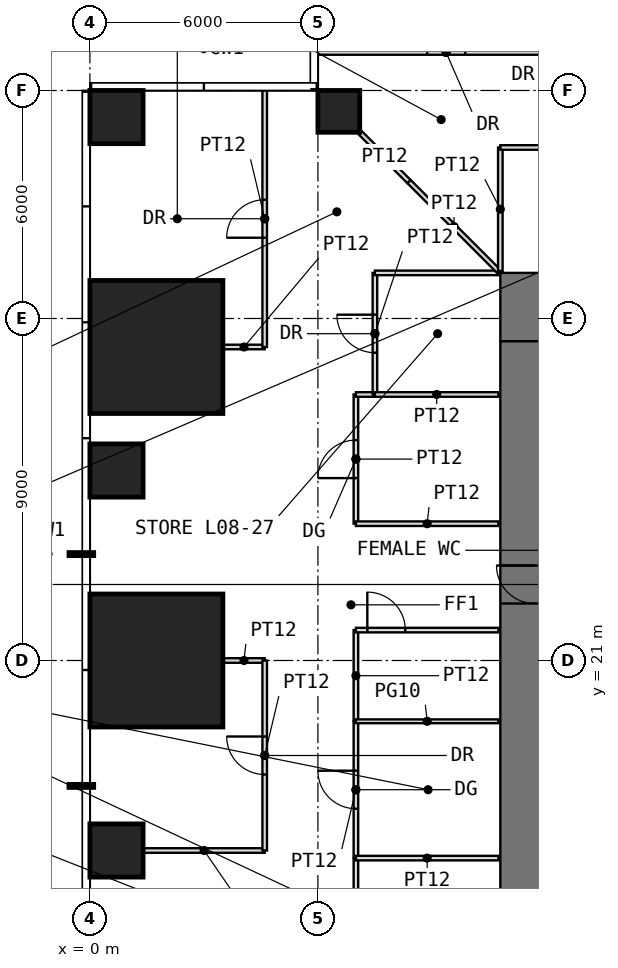
"""IFC4 building model, lengths in metres.
Left out: names, types, materials, properties, quantities, classifications, styles, units other than length and angle.
Written with IfcOpenShell. Run it as: python <this file> out.ifc"""

import sys

from ifc_helpers import new_model, si_unit, direction, frame, frame_2d, origin, origin_2d, place, context, subcontext, project, spatial, rectangle, extrude, element, fill, save


model = new_model("IFC4")
c1 = context("Model", 3, precision=1e-05, world=origin(), true_north=direction((0.0, 1.0)))
c2 = subcontext(c1, "Body", "Model", "MODEL_VIEW")
j1 = project(units=[si_unit("LENGTHUNIT", "METRE"), si_unit("PLANEANGLEUNIT", "RADIAN")], contexts=[c1])
p1 = place(None, origin())
s1 = spatial("IfcSite", under=j1, at=p1, CompositionType="ELEMENT")
p2 = place(p1, origin())
s2 = spatial("IfcBuilding", under=s1, at=p2, CompositionType="ELEMENT")
p3 = place(p2, frame((0.0, 0.0, 38.5)))
s3 = spatial("IfcBuildingStorey", under=s2, at=p3, CompositionType="ELEMENT", Elevation=38.5)
p4 = place(p3, frame((0.7, 16.0, 0.0), z_axis=(0.0, 0.0, 1.0), x_axis=(1.0, 0.0, 0.0)))
e1 = element("IfcColumn", 1, at=p4, inside=s3, PredefinedType="COLUMN", context=c2, shape_type="SweptSolid", body=[
    extrude(rectangle(XDim=1.4, YDim=1.4, at=origin_2d()), origin(), (0.0, 0.0, 1.0), 4.0),
])
p5 = place(p3, frame((1.75, 21.0, 0.0), z_axis=(0.0, 0.0, 1.0), x_axis=(1.0, 0.0, 0.0)))
e2 = element("IfcColumn", 2, at=p5, inside=s3, PredefinedType="COLUMN", context=c2, shape_type="SweptSolid", body=[
    extrude(rectangle(XDim=3.5, YDim=3.5, at=origin_2d()), origin(), (0.0, 0.0, 1.0), 4.0),
])
p6 = place(p3, frame((0.7, 26.0, 0.0), z_axis=(0.0, 0.0, 1.0), x_axis=(1.0, 0.0, 0.0)))
e3 = element("IfcColumn", 3, at=p6, inside=s3, PredefinedType="COLUMN", context=c2, shape_type="SweptSolid", body=[
    extrude(rectangle(XDim=1.4, YDim=1.4, at=origin_2d()), origin(), (0.0, 0.0, 1.0), 4.0),
])
p7 = place(p3, frame((1.75, 29.25, 0.0), z_axis=(0.0, 0.0, 1.0), x_axis=(1.0, 0.0, 0.0)))
e4 = element("IfcColumn", 4, at=p7, inside=s3, PredefinedType="COLUMN", context=c2, shape_type="SweptSolid", body=[
    extrude(rectangle(XDim=3.5, YDim=3.5, at=origin_2d()), origin(), (0.0, 0.0, 1.0), 4.0),
])
p8 = place(p3, frame((0.7, 35.3, 0.0), z_axis=(0.0, 0.0, 1.0), x_axis=(1.0, 0.0, 0.0)))
e5 = element("IfcColumn", 5, at=p8, inside=s3, PredefinedType="COLUMN", context=c2, shape_type="SweptSolid", body=[
    extrude(rectangle(XDim=1.4, YDim=1.4, at=origin_2d()), origin(), (0.0, 0.0, 1.0), 4.0),
])
p9 = place(p3, frame((6.55, 35.45, 0.0), z_axis=(0.0, 0.0, 1.0), x_axis=(1.0, 0.0, 0.0)))
e6 = element("IfcColumn", 6, at=p9, inside=s3, PredefinedType="COLUMN", context=c2, shape_type="SweptSolid", body=[
    extrude(rectangle(XDim=1.1, YDim=1.1, at=origin_2d()), origin(), (0.0, 0.0, 1.0), 4.0),
])
p10 = place(p3, frame((10.8, 30.3, -0.05), z_axis=(0.0, 0.0, 1.0), x_axis=(1.0, 0.0, 0.0)))
e7 = element("IfcWall", 7, at=p10, inside=s3, PredefinedType="SHEAR", context=c2, shape_type="SweptSolid", body=[
    extrude(rectangle(XDim=20.4, YDim=1.8, at=frame_2d((10.2, 0.0))), origin(), (0.0, 0.0, 1.0), 4.0),
])
p11 = place(p10, frame((9.2, 0.0, 0.05)))
e8 = element("IfcOpeningElement", 8, at=p11, cuts=e7, PredefinedType="OPENING", context=c2, shape_type="SweptSolid", body=[
    extrude(rectangle(XDim=2.0, YDim=2.2, at=frame_2d((1.0, 1.1))), frame((0.0, 0.91, 0.0), z_axis=(0.0, -1.0, 0.0), x_axis=(1.0, 0.0, 0.0)), (0.0, 0.0, 1.0), 1.82),
])
p12 = place(p3, frame((11.7, 12.6, -0.05), z_axis=(0.0, 0.0, 1.0), x_axis=(0.0, 1.0, 0.0)))
e9 = element("IfcWall", 9, at=p12, inside=s3, PredefinedType="SHEAR", context=c2, shape_type="SweptSolid", body=[
    extrude(rectangle(XDim=16.8, YDim=1.8, at=frame_2d((8.4, 0.0))), origin(), (0.0, 0.0, 1.0), 4.0),
])
p13 = place(p12, frame((9.9, 0.0, 0.05)))
e10 = element("IfcOpeningElement", 10, at=p13, cuts=e9, PredefinedType="OPENING", context=c2, shape_type="SweptSolid", body=[
    extrude(rectangle(XDim=1.0, YDim=2.2, at=frame_2d((0.5, 1.1))), frame((0.0, 0.91, 0.0), z_axis=(0.0, -1.0, 0.0), x_axis=(1.0, 0.0, 0.0)), (0.0, 0.0, 1.0), 1.82),
])
p14 = place(p3, frame((1.41, 16.0, 0.0), z_axis=(0.0, 0.0, 1.0), x_axis=(1.0, 0.0, 0.0)))
e11 = element("IfcWall", 11, at=p14, inside=s3, PredefinedType="PARTITIONING", context=c2, shape_type="SweptSolid", body=[
    extrude(rectangle(XDim=3.19, YDim=0.12, at=frame_2d((1.595, 0.0))), origin(), (0.0, 0.0, 1.0), 3.75),
])
for number, where, z_axis, x_axis in (
    (12, (3.51, 21.0, 0.0), (0.0, 0.0, 1.0), (1.0, 0.0, 0.0)),
    (13, (3.51, 29.25, 0.0), (0.0, 0.0, 1.0), (1.0, 0.0, 0.0)),
):
    element("IfcWall", number, at=place(p3, frame(where, z_axis=z_axis, x_axis=x_axis)), inside=s3, PredefinedType="PARTITIONING", context=c2, shape_type="SweptSolid", body=[
        extrude(rectangle(XDim=1.09, YDim=0.12, at=frame_2d((0.545, 0.0))), origin(), (0.0, 0.0, 1.0), 3.75),
    ])
p15 = place(p3, frame((4.6, 16.0, 0.0), z_axis=(0.0, 0.0, 1.0), x_axis=(0.0, 1.0, 0.0)))
e14 = element("IfcWall", 14, at=p15, inside=s3, PredefinedType="PARTITIONING", context=c2, shape_type="SweptSolid", body=[
    extrude(rectangle(XDim=5.0, YDim=0.12, at=frame_2d((2.5, 0.0))), origin(), (0.0, 0.0, 1.0), 3.75),
])
p16 = place(p15, frame((2.0, 0.0, 0.0)))
e15 = element("IfcOpeningElement", 15, at=p16, cuts=e14, PredefinedType="OPENING", context=c2, shape_type="SweptSolid", body=[
    extrude(rectangle(XDim=1.0, YDim=2.2, at=frame_2d((0.5, 1.1))), frame((0.0, 0.07, 0.0), z_axis=(0.0, -1.0, 0.0), x_axis=(1.0, 0.0, 0.0)), (0.0, 0.0, 1.0), 0.14),
])
p17 = place(p3, frame((4.6, 29.25, 0.0), z_axis=(0.0, 0.0, 1.0), x_axis=(0.0, 1.0, 0.0)))
e16 = element("IfcWall", 16, at=p17, inside=s3, PredefinedType="PARTITIONING", context=c2, shape_type="SweptSolid", body=[
    extrude(rectangle(XDim=6.75, YDim=0.12, at=frame_2d((3.375, 0.0))), origin(), (0.0, 0.0, 1.0), 3.75),
])
p18 = place(p17, frame((2.875, 0.0, 0.0)))
e17 = element("IfcOpeningElement", 17, at=p18, cuts=e16, PredefinedType="OPENING", context=c2, shape_type="SweptSolid", body=[
    extrude(rectangle(XDim=1.0, YDim=2.2, at=frame_2d((0.5, 1.1))), frame((0.0, 0.07, 0.0), z_axis=(0.0, -1.0, 0.0), x_axis=(1.0, 0.0, 0.0)), (0.0, 0.0, 1.0), 0.14),
])
p19 = place(p3, frame((6.0, 37.0, 0.0), z_axis=(0.0, 0.0, 1.0), x_axis=(1.0, 0.0, 0.0)))
e18 = element("IfcWall", 18, at=p19, inside=s3, PredefinedType="PARTITIONING", context=c2, shape_type="SweptSolid", body=[
    extrude(rectangle(XDim=6.75, YDim=0.12, at=frame_2d((3.375, 0.0))), origin(), (0.0, 0.0, 1.0), 3.75),
])
p20 = place(p19, frame((2.875, 0.0, 0.0)))
e19 = element("IfcOpeningElement", 19, at=p20, cuts=e18, PredefinedType="OPENING", context=c2, shape_type="SweptSolid", body=[
    extrude(rectangle(XDim=1.0, YDim=2.2, at=frame_2d((0.5, 1.1))), frame((0.0, 0.07, 0.0), z_axis=(0.0, -1.0, 0.0), x_axis=(1.0, 0.0, 0.0)), (0.0, 0.0, 1.0), 0.14),
])
p21 = place(p3, frame((7.0, 10.8, 0.0), z_axis=(0.0, 0.0, 1.0), x_axis=(0.0, 1.0, 0.0)))
e20 = element("IfcWall", 20, at=p21, inside=s3, PredefinedType="PARTITIONING", context=c2, shape_type="SweptSolid", body=[
    extrude(rectangle(XDim=5.0, YDim=0.12, at=frame_2d((2.5, 0.0))), origin(), (0.0, 0.0, 1.0), 3.75),
])
p22 = place(p21, frame((2.0, 0.0, 0.0)))
e21 = element("IfcOpeningElement", 21, at=p22, cuts=e20, PredefinedType="OPENING", context=c2, shape_type="SweptSolid", body=[
    extrude(rectangle(XDim=1.0, YDim=2.2, at=frame_2d((0.5, 1.1))), frame((0.0, 0.07, 0.0), z_axis=(0.0, -1.0, 0.0), x_axis=(1.0, 0.0, 0.0)), (0.0, 0.0, 1.0), 0.14),
])
p23 = place(p3, frame((7.0, 15.8, 0.0), z_axis=(0.0, 0.0, 1.0), x_axis=(0.0, 1.0, 0.0)))
e22 = element("IfcWall", 22, at=p23, inside=s3, PredefinedType="PARTITIONING", context=c2, shape_type="SweptSolid", body=[
    extrude(rectangle(XDim=3.6, YDim=0.12, at=frame_2d((1.8, 0.0))), origin(), (0.0, 0.0, 1.0), 3.75),
])
p24 = place(p23, frame((1.3, 0.0, 0.0)))
e23 = element("IfcOpeningElement", 23, at=p24, cuts=e22, PredefinedType="OPENING", context=c2, shape_type="SweptSolid", body=[
    extrude(rectangle(XDim=1.0, YDim=2.4, at=frame_2d((0.5, 1.2))), frame((0.0, 0.07, 0.0), z_axis=(0.0, -1.0, 0.0), x_axis=(1.0, 0.0, 0.0)), (0.0, 0.0, 1.0), 0.14),
])
p25 = place(p3, frame((7.0, 15.8, 0.0), z_axis=(0.0, 0.0, 1.0), x_axis=(1.0, 0.0, 0.0)))
e24 = element("IfcWall", 24, at=p25, inside=s3, PredefinedType="PARTITIONING", context=c2, shape_type="SweptSolid", body=[
    extrude(rectangle(XDim=3.75, YDim=0.12, at=frame_2d((1.875, 0.0))), origin(), (0.0, 0.0, 1.0), 3.75),
])
p26 = place(p3, frame((7.0, 19.4, 0.0), z_axis=(0.0, 0.0, 1.0), x_axis=(0.0, 1.0, 0.0)))
e25 = element("IfcWall", 25, at=p26, inside=s3, PredefinedType="PARTITIONING", context=c2, shape_type="SweptSolid", body=[
    extrude(rectangle(XDim=2.4, YDim=0.12, at=frame_2d((1.2, 0.0))), origin(), (0.0, 0.0, 1.0), 3.75),
])
p27 = place(p3, frame((7.0, 19.4, 0.0), z_axis=(0.0, 0.0, 1.0), x_axis=(1.0, 0.0, 0.0)))
e26 = element("IfcWall", 26, at=p27, inside=s3, PredefinedType="PARTITIONING", context=c2, shape_type="SweptSolid", body=[
    extrude(rectangle(XDim=3.75, YDim=0.1, at=frame_2d((1.875, 0.0))), origin(), (0.0, 0.0, 1.0), 3.75),
])
p28 = place(p3, frame((7.0, 21.8, 0.0), z_axis=(0.0, 0.0, 1.0), x_axis=(1.0, 0.0, 0.0)))
e27 = element("IfcWall", 27, at=p28, inside=s3, PredefinedType="PARTITIONING", context=c2, shape_type="SweptSolid", body=[
    extrude(rectangle(XDim=3.75, YDim=0.12, at=frame_2d((1.875, 0.0))), origin(), (0.0, 0.0, 1.0), 3.75),
])
p29 = place(p28, frame((0.3, 0.0, 0.0)))
e28 = element("IfcOpeningElement", 28, at=p29, cuts=e27, PredefinedType="OPENING", context=c2, shape_type="SweptSolid", body=[
    extrude(rectangle(XDim=1.0, YDim=2.4, at=frame_2d((0.5, 1.2))), frame((0.0, 0.07, 0.0), z_axis=(0.0, -1.0, 0.0), x_axis=(1.0, 0.0, 0.0)), (0.0, 0.0, 1.0), 0.14),
])
p30 = place(p3, frame((7.0, 24.6, 0.0), z_axis=(0.0, 0.0, 1.0), x_axis=(0.0, 1.0, 0.0)))
e29 = element("IfcWall", 29, at=p30, inside=s3, PredefinedType="PARTITIONING", context=c2, shape_type="SweptSolid", body=[
    extrude(rectangle(XDim=3.4, YDim=0.12, at=frame_2d((1.7, 0.0))), origin(), (0.0, 0.0, 1.0), 3.75),
])
p31 = place(p30, frame((1.2, 0.0, 0.0)))
e30 = element("IfcOpeningElement", 30, at=p31, cuts=e29, PredefinedType="OPENING", context=c2, shape_type="SweptSolid", body=[
    extrude(rectangle(XDim=1.0, YDim=2.4, at=frame_2d((0.5, 1.2))), frame((0.0, 0.07, 0.0), z_axis=(0.0, -1.0, 0.0), x_axis=(1.0, 0.0, 0.0)), (0.0, 0.0, 1.0), 0.14),
])
p32 = place(p3, frame((7.0, 24.6, 0.0), z_axis=(0.0, 0.0, 1.0), x_axis=(1.0, 0.0, 0.0)))
e31 = element("IfcWall", 31, at=p32, inside=s3, PredefinedType="PARTITIONING", context=c2, shape_type="SweptSolid", body=[
    extrude(rectangle(XDim=3.75, YDim=0.12, at=frame_2d((1.875, 0.0))), origin(), (0.0, 0.0, 1.0), 3.75),
])
p33 = place(p3, frame((7.0, 28.0, 0.0), z_axis=(0.0, 0.0, 1.0), x_axis=(1.0, 0.0, 0.0)))
e32 = element("IfcWall", 32, at=p33, inside=s3, PredefinedType="PARTITIONING", context=c2, shape_type="SweptSolid", body=[
    extrude(rectangle(XDim=0.5, YDim=0.12, at=frame_2d((0.25, 0.0))), origin(), (0.0, 0.0, 1.0), 3.75),
])
p34 = place(p3, frame((7.11, 34.89, 0.0), z_axis=(0.0, 0.0, 1.0), x_axis=(0.707106781187, -0.707106781187, 0.0)))
e33 = element("IfcWall", 33, at=p34, inside=s3, PredefinedType="PARTITIONING", context=c2, shape_type="SweptSolid", body=[
    extrude(rectangle(XDim=1.822, YDim=0.12, at=frame_2d((0.911, 0.0))), origin(), (0.0, 0.0, 1.0), 3.75),
])
p35 = place(p3, frame((7.5, 28.0, 0.0), z_axis=(0.0, 0.0, 1.0), x_axis=(0.0, 1.0, 0.0)))
e34 = element("IfcWall", 34, at=p35, inside=s3, PredefinedType="PARTITIONING", context=c2, shape_type="SweptSolid", body=[
    extrude(rectangle(XDim=3.2, YDim=0.12, at=frame_2d((1.6, 0.0))), origin(), (0.0, 0.0, 1.0), 3.75),
])
p36 = place(p35, frame((1.1, 0.0, 0.0)))
e35 = element("IfcOpeningElement", 35, at=p36, cuts=e34, PredefinedType="OPENING", context=c2, shape_type="SweptSolid", body=[
    extrude(rectangle(XDim=1.0, YDim=2.2, at=frame_2d((0.5, 1.1))), frame((0.0, 0.07, 0.0), z_axis=(0.0, -1.0, 0.0), x_axis=(1.0, 0.0, 0.0)), (0.0, 0.0, 1.0), 0.14),
])
for number, where, z_axis, x_axis in (
    (36, (7.5, 28.0, 0.0), (0.0, 0.0, 1.0), (1.0, 0.0, 0.0)),
    (37, (7.5, 31.2, 0.0), (0.0, 0.0, 1.0), (1.0, 0.0, 0.0)),
):
    element("IfcWall", number, at=place(p3, frame(where, z_axis=z_axis, x_axis=x_axis)), inside=s3, PredefinedType="PARTITIONING", context=c2, shape_type="SweptSolid", body=[
        extrude(rectangle(XDim=3.25, YDim=0.12, at=frame_2d((1.625, 0.0))), origin(), (0.0, 0.0, 1.0), 3.75),
    ])
p37 = place(p3, frame((8.398, 33.602, 0.0), z_axis=(0.0, 0.0, 1.0), x_axis=(0.707106781187, -0.707106781187, 0.0)))
e38 = element("IfcWall", 38, at=p37, inside=s3, PredefinedType="PARTITIONING", context=c2, shape_type="SweptSolid", body=[
    extrude(rectangle(XDim=3.346, YDim=0.12, at=frame_2d((1.673, 0.0))), origin(), (0.0, 0.0, 1.0), 3.75),
])
p38 = place(p3, frame((10.8, 31.25, 0.0), z_axis=(0.0, 0.0, 1.0), x_axis=(0.0, 1.0, 0.0)))
e39 = element("IfcWall", 39, at=p38, inside=s3, PredefinedType="PARTITIONING", context=c2, shape_type="SweptSolid", body=[
    extrude(rectangle(XDim=3.25, YDim=0.12, at=frame_2d((1.625, 0.0))), origin(), (0.0, 0.0, 1.0), 3.75),
])
p39 = place(p3, frame((10.8, 34.5, 0.0), z_axis=(0.0, 0.0, 1.0), x_axis=(1.0, 0.0, 0.0)))
e40 = element("IfcWall", 40, at=p39, inside=s3, PredefinedType="PARTITIONING", context=c2, shape_type="SweptSolid", body=[
    extrude(rectangle(XDim=3.4, YDim=0.12, at=frame_2d((1.7, 0.0))), origin(), (0.0, 0.0, 1.0), 3.75),
])
p40 = place(p39, frame((1.2, 0.0, 0.0)))
e41 = element("IfcOpeningElement", 41, at=p40, cuts=e40, PredefinedType="OPENING", context=c2, shape_type="SweptSolid", body=[
    extrude(rectangle(XDim=1.0, YDim=2.2, at=frame_2d((0.5, 1.1))), frame((0.0, 0.07, 0.0), z_axis=(0.0, -1.0, 0.0), x_axis=(1.0, 0.0, 0.0)), (0.0, 0.0, 1.0), 0.14),
])
p41 = place(p13, origin())
e42 = element("IfcDoor", 42, at=p41, inside=s3, OperationType="SINGLE_SWING_RIGHT", PredefinedType="DOOR", context=c2, shape_type="SweptSolid", body=[
    extrude(rectangle(XDim=1.0, YDim=2.2, at=frame_2d((0.5, 1.1))), frame((0.0, 0.025, 0.0), z_axis=(0.0, -1.0, 0.0), x_axis=(1.0, 0.0, 0.0)), (0.0, 0.0, 1.0), 0.05),
])
fill(e10, e42)
p42 = place(p20, origin())
e43 = element("IfcDoor", 43, at=p42, inside=s3, OperationType="SINGLE_SWING_RIGHT", PredefinedType="DOOR", context=c2, shape_type="SweptSolid", body=[
    extrude(rectangle(XDim=1.0, YDim=2.2, at=frame_2d((0.5, 1.1))), frame((0.0, 0.025, 0.0), z_axis=(0.0, -1.0, 0.0), x_axis=(1.0, 0.0, 0.0)), (0.0, 0.0, 1.0), 0.05),
])
fill(e19, e43)
p43 = place(p24, origin())
e44 = element("IfcDoor", 44, at=p43, inside=s3, OperationType="SINGLE_SWING_RIGHT", PredefinedType="DOOR", context=c2, shape_type="SweptSolid", body=[
    extrude(rectangle(XDim=1.0, YDim=2.4, at=frame_2d((0.5, 1.2))), frame((0.0, 0.025, 0.0), z_axis=(0.0, -1.0, 0.0), x_axis=(1.0, 0.0, 0.0)), (0.0, 0.0, 1.0), 0.05),
])
fill(e23, e44)
p44 = place(p31, origin())
e45 = element("IfcDoor", 45, at=p44, inside=s3, OperationType="SINGLE_SWING_LEFT", PredefinedType="DOOR", context=c2, shape_type="SweptSolid", body=[
    extrude(rectangle(XDim=1.0, YDim=2.4, at=frame_2d((0.5, 1.2))), frame((0.0, 0.025, 0.0), z_axis=(0.0, -1.0, 0.0), x_axis=(1.0, 0.0, 0.0)), (0.0, 0.0, 1.0), 0.05),
])
fill(e30, e45)
p45 = place(p36, origin())
e46 = element("IfcDoor", 46, at=p45, inside=s3, OperationType="SINGLE_SWING_RIGHT", PredefinedType="DOOR", context=c2, shape_type="SweptSolid", body=[
    extrude(rectangle(XDim=1.0, YDim=2.2, at=frame_2d((0.5, 1.1))), frame((0.0, 0.025, 0.0), z_axis=(0.0, -1.0, 0.0), x_axis=(1.0, 0.0, 0.0)), (0.0, 0.0, 1.0), 0.05),
])
fill(e35, e46)
p46 = place(p16, origin())
e47 = element("IfcDoor", 47, at=p46, inside=s3, OperationType="SINGLE_SWING_RIGHT", PredefinedType="DOOR", context=c2, shape_type="SweptSolid", body=[
    extrude(rectangle(XDim=1.0, YDim=2.2, at=frame_2d((0.5, 1.1))), frame((0.0, 0.025, 0.0), z_axis=(0.0, -1.0, 0.0), x_axis=(1.0, 0.0, 0.0)), (0.0, 0.0, 1.0), 0.05),
])
fill(e15, e47)
p47 = place(p18, origin())
e48 = element("IfcDoor", 48, at=p47, inside=s3, OperationType="SINGLE_SWING_LEFT", PredefinedType="DOOR", context=c2, shape_type="SweptSolid", body=[
    extrude(rectangle(XDim=1.0, YDim=2.2, at=frame_2d((0.5, 1.1))), frame((0.0, 0.025, 0.0), z_axis=(0.0, -1.0, 0.0), x_axis=(1.0, 0.0, 0.0)), (0.0, 0.0, 1.0), 0.05),
])
fill(e17, e48)
p48 = place(p29, origin())
e49 = element("IfcDoor", 49, at=p48, inside=s3, OperationType="SINGLE_SWING_LEFT", PredefinedType="DOOR", context=c2, shape_type="SweptSolid", body=[
    extrude(rectangle(XDim=1.0, YDim=2.4, at=frame_2d((0.5, 1.2))), frame((0.0, 0.025, 0.0), z_axis=(0.0, -1.0, 0.0), x_axis=(1.0, 0.0, 0.0)), (0.0, 0.0, 1.0), 0.05),
])
fill(e28, e49)
save(model, sys.argv[1])
